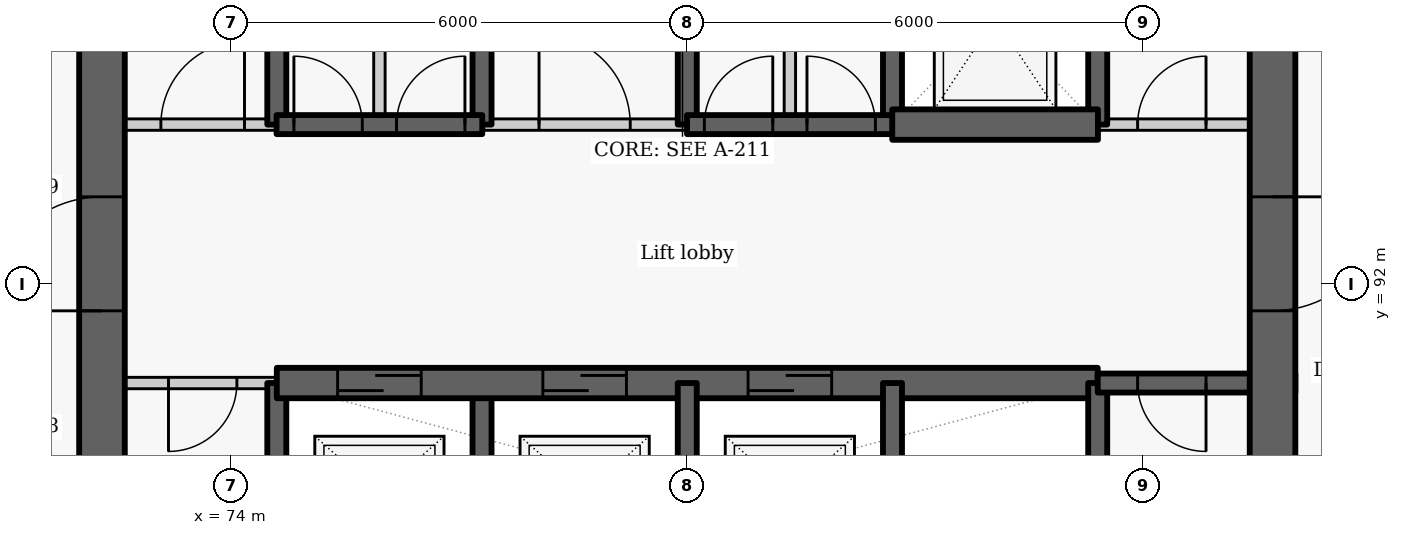
"""IFC4 building model, lengths in metres.
Left out: names, types, materials, properties, quantities, classifications, styles, units other than length and angle.
Written with IfcOpenShell. Run it as: python <this file> out.ifc"""

import sys

from ifc_helpers import new_model, si_unit, direction, frame, frame_2d, origin, place, context, subcontext, project, spatial, rectangle, extrude, element, fill, save


model = new_model("IFC4")
c1 = context("Model", 3, precision=1e-05, world=origin(), true_north=direction((0.0, 1.0)))
c2 = subcontext(c1, "Body", "Model", "MODEL_VIEW")
j1 = project(units=[si_unit("LENGTHUNIT", "METRE"), si_unit("PLANEANGLEUNIT", "RADIAN")], contexts=[c1])
p1 = place(None, origin())
s1 = spatial("IfcSite", under=j1, at=p1, CompositionType="ELEMENT")
p2 = place(p1, origin())
s2 = spatial("IfcBuilding", under=s1, at=p2, CompositionType="ELEMENT")
p3 = place(p2, frame((0.0, 0.0, 44.7)))
s3 = spatial("IfcBuildingStorey", under=s2, at=p3, CompositionType="ELEMENT", Elevation=44.7)
p4 = place(p3, frame((74.6, 87.8, -0.275), z_axis=(0.0, 0.0, 1.0), x_axis=(0.0, 1.0, 0.0)))
e1 = element("IfcWall", 1, at=p4, inside=s3, PredefinedType="SHEAR", context=c2, shape_type="SweptSolid", body=[
    extrude(rectangle(XDim=2.9, YDim=0.25, at=frame_2d((1.45, 0.0))), origin(), (0.0, 0.0, 1.0), 3.3),
])
p5 = place(p3, frame((74.6, 94.1, -0.275), z_axis=(0.0, 0.0, 1.0), x_axis=(0.0, 1.0, 0.0)))
e2 = element("IfcWall", 2, at=p5, inside=s3, PredefinedType="SHEAR", context=c2, shape_type="SweptSolid", body=[
    extrude(rectangle(XDim=2.8, YDim=0.25, at=frame_2d((1.4, 0.0))), origin(), (0.0, 0.0, 1.0), 3.3),
])
p6 = place(p3, frame((74.6, 90.7, 0.0), z_axis=(0.0, 0.0, 1.0), x_axis=(-1.0, 0.0, 0.0)))
e3 = element("IfcWall", 3, at=p6, inside=s3, PredefinedType="PARTITIONING", context=c2, shape_type="SweptSolid", body=[
    extrude(rectangle(XDim=2.6, YDim=0.15, at=frame_2d((1.3, 0.0))), origin(), (0.0, 0.0, 1.0), 3.025),
])
p7 = place(p6, frame((0.525, 0.0, 0.0)))
e4 = element("IfcOpeningElement", 4, at=p7, cuts=e3, PredefinedType="OPENING", context=c2, shape_type="SweptSolid", body=[
    extrude(rectangle(XDim=0.9, YDim=2.1, at=frame_2d((0.45, 1.05))), frame((0.0, 0.085, 0.0), z_axis=(0.0, -1.0, 0.0), x_axis=(1.0, 0.0, 0.0)), (0.0, 0.0, 1.0), 0.17),
])
p8 = place(p3, frame((72.3, 87.8, -0.275), z_axis=(0.0, 0.0, 1.0), x_axis=(0.0, 1.0, 0.0)))
e5 = element("IfcWall", 5, at=p8, inside=s3, PredefinedType="SHEAR", context=c2, shape_type="SweptSolid", body=[
    extrude(rectangle(XDim=9.1, YDim=0.6, at=frame_2d((4.55, 0.0))), origin(), (0.0, 0.0, 1.0), 3.3),
])
p9 = place(p8, frame((3.85, 0.0, 0.275)))
e6 = element("IfcOpeningElement", 6, at=p9, cuts=e5, PredefinedType="OPENING", context=c2, shape_type="SweptSolid", body=[
    extrude(rectangle(XDim=1.5, YDim=2.1, at=frame_2d((0.75, 1.05))), frame((0.0, 0.31, 0.0), z_axis=(0.0, -1.0, 0.0), x_axis=(1.0, 0.0, 0.0)), (0.0, 0.0, 1.0), 0.62),
])
p10 = place(p3, frame((77.3, 87.8, -0.275), z_axis=(0.0, 0.0, 1.0), x_axis=(0.0, 1.0, 0.0)))
e7 = element("IfcWall", 7, at=p10, inside=s3, PredefinedType="SHEAR", context=c2, shape_type="SweptSolid", body=[
    extrude(rectangle(XDim=2.9, YDim=0.25, at=frame_2d((1.45, 0.0))), origin(), (0.0, 0.0, 1.0), 3.3),
])
p11 = place(p3, frame((77.3, 94.1, -0.275), z_axis=(0.0, 0.0, 1.0), x_axis=(0.0, 1.0, 0.0)))
e8 = element("IfcWall", 8, at=p11, inside=s3, PredefinedType="SHEAR", context=c2, shape_type="SweptSolid", body=[
    extrude(rectangle(XDim=2.8, YDim=0.25, at=frame_2d((1.4, 0.0))), origin(), (0.0, 0.0, 1.0), 3.3),
])
p12 = place(p3, frame((74.6, 90.7, -0.275), z_axis=(0.0, 0.0, 1.0), x_axis=(1.0, 0.0, 0.0)))
e9 = element("IfcWall", 9, at=p12, inside=s3, PredefinedType="SHEAR", context=c2, shape_type="SweptSolid", body=[
    extrude(rectangle(XDim=10.8, YDim=0.4, at=frame_2d((5.4, 0.0))), origin(), (0.0, 0.0, 1.0), 3.3),
])
p13 = place(p12, frame((0.8, 0.0, 0.275)))
e10 = element("IfcOpeningElement", 10, at=p13, cuts=e9, PredefinedType="OPENING", context=c2, shape_type="SweptSolid", body=[
    extrude(rectangle(XDim=1.1, YDim=2.1, at=frame_2d((0.55, 1.05))), frame((0.0, 0.21, 0.0), z_axis=(0.0, -1.0, 0.0), x_axis=(1.0, 0.0, 0.0)), (0.0, 0.0, 1.0), 0.42),
])
p14 = place(p12, frame((3.5, 0.0, 0.275)))
e11 = element("IfcOpeningElement", 11, at=p14, cuts=e9, PredefinedType="OPENING", context=c2, shape_type="SweptSolid", body=[
    extrude(rectangle(XDim=1.1, YDim=2.1, at=frame_2d((0.55, 1.05))), frame((0.0, 0.21, 0.0), z_axis=(0.0, -1.0, 0.0), x_axis=(1.0, 0.0, 0.0)), (0.0, 0.0, 1.0), 0.42),
])
p15 = place(p12, frame((6.2, 0.0, 0.275)))
e12 = element("IfcOpeningElement", 12, at=p15, cuts=e9, PredefinedType="OPENING", context=c2, shape_type="SweptSolid", body=[
    extrude(rectangle(XDim=1.1, YDim=2.1, at=frame_2d((0.55, 1.05))), frame((0.0, 0.21, 0.0), z_axis=(0.0, -1.0, 0.0), x_axis=(1.0, 0.0, 0.0)), (0.0, 0.0, 1.0), 0.42),
])
p16 = place(p3, frame((80.0, 87.8, -0.275), z_axis=(0.0, 0.0, 1.0), x_axis=(0.0, 1.0, 0.0)))
e13 = element("IfcWall", 13, at=p16, inside=s3, PredefinedType="SHEAR", context=c2, shape_type="SweptSolid", body=[
    extrude(rectangle(XDim=2.9, YDim=0.25, at=frame_2d((1.45, 0.0))), origin(), (0.0, 0.0, 1.0), 3.3),
])
p17 = place(p3, frame((80.0, 94.1, -0.275), z_axis=(0.0, 0.0, 1.0), x_axis=(0.0, 1.0, 0.0)))
e14 = element("IfcWall", 14, at=p17, inside=s3, PredefinedType="SHEAR", context=c2, shape_type="SweptSolid", body=[
    extrude(rectangle(XDim=2.8, YDim=0.25, at=frame_2d((1.4, 0.0))), origin(), (0.0, 0.0, 1.0), 3.3),
])
p18 = place(p3, frame((82.7, 87.8, -0.275), z_axis=(0.0, 0.0, 1.0), x_axis=(0.0, 1.0, 0.0)))
e15 = element("IfcWall", 15, at=p18, inside=s3, PredefinedType="SHEAR", context=c2, shape_type="SweptSolid", body=[
    extrude(rectangle(XDim=2.9, YDim=0.25, at=frame_2d((1.45, 0.0))), origin(), (0.0, 0.0, 1.0), 3.3),
])
p19 = place(p3, frame((82.7, 94.1, -0.275), z_axis=(0.0, 0.0, 1.0), x_axis=(0.0, 1.0, 0.0)))
e16 = element("IfcWall", 16, at=p19, inside=s3, PredefinedType="SHEAR", context=c2, shape_type="SweptSolid", body=[
    extrude(rectangle(XDim=2.8, YDim=0.25, at=frame_2d((1.4, 0.0))), origin(), (0.0, 0.0, 1.0), 3.3),
])
p20 = place(p3, frame((85.4, 87.8, -0.275), z_axis=(0.0, 0.0, 1.0), x_axis=(0.0, 1.0, 0.0)))
e17 = element("IfcWall", 17, at=p20, inside=s3, PredefinedType="SHEAR", context=c2, shape_type="SweptSolid", body=[
    extrude(rectangle(XDim=2.9, YDim=0.25, at=frame_2d((1.45, 0.0))), origin(), (0.0, 0.0, 1.0), 3.3),
])
p21 = place(p3, frame((85.4, 94.1, -0.275), z_axis=(0.0, 0.0, 1.0), x_axis=(0.0, 1.0, 0.0)))
e18 = element("IfcWall", 18, at=p21, inside=s3, PredefinedType="SHEAR", context=c2, shape_type="SweptSolid", body=[
    extrude(rectangle(XDim=2.8, YDim=0.25, at=frame_2d((1.4, 0.0))), origin(), (0.0, 0.0, 1.0), 3.3),
])
p22 = place(p3, frame((88.0, 90.7, -0.275), z_axis=(0.0, 0.0, 1.0), x_axis=(-1.0, 0.0, 0.0)))
e19 = element("IfcWall", 19, at=p22, inside=s3, PredefinedType="SHEAR", context=c2, shape_type="SweptSolid", body=[
    extrude(rectangle(XDim=2.6, YDim=0.25, at=frame_2d((1.3, 0.0))), origin(), (0.0, 0.0, 1.0), 3.3),
])
p23 = place(p22, frame((1.175, 0.0, 0.275)))
e20 = element("IfcOpeningElement", 20, at=p23, cuts=e19, PredefinedType="OPENING", context=c2, shape_type="SweptSolid", body=[
    extrude(rectangle(XDim=0.9, YDim=2.1, at=frame_2d((0.45, 1.05))), frame((0.0, 0.135, 0.0), z_axis=(0.0, -1.0, 0.0), x_axis=(1.0, 0.0, 0.0)), (0.0, 0.0, 1.0), 0.27),
])
p24 = place(p3, frame((87.7, 103.4, -0.275), z_axis=(0.0, 0.0, 1.0), x_axis=(0.0, -1.0, 0.0)))
e21 = element("IfcWall", 21, at=p24, inside=s3, PredefinedType="SHEAR", context=c2, shape_type="SweptSolid", body=[
    extrude(rectangle(XDim=15.6, YDim=0.6, at=frame_2d((7.8, 0.0))), origin(), (0.0, 0.0, 1.0), 3.3),
])
p25 = place(p24, frame((10.25, 0.0, 0.275)))
e22 = element("IfcOpeningElement", 22, at=p25, cuts=e21, PredefinedType="OPENING", context=c2, shape_type="SweptSolid", body=[
    extrude(rectangle(XDim=1.5, YDim=2.1, at=frame_2d((0.75, 1.05))), frame((0.0, 0.31, 0.0), z_axis=(0.0, -1.0, 0.0), x_axis=(1.0, 0.0, 0.0)), (0.0, 0.0, 1.0), 0.62),
])
p26 = place(p24, frame((2.7, 0.0, 0.275)))
e23 = element("IfcOpeningElement", 23, at=p26, cuts=e21, PredefinedType="OPENING", context=c2, shape_type="SweptSolid", body=[
    extrude(rectangle(XDim=1.1, YDim=2.1, at=frame_2d((0.55, 1.05))), frame((0.0, 0.31, 0.0), z_axis=(0.0, -1.0, 0.0), x_axis=(1.0, 0.0, 0.0)), (0.0, 0.0, 1.0), 0.62),
])
p27 = place(p3, frame((72.0, 94.1, 0.0), z_axis=(0.0, 0.0, 1.0), x_axis=(1.0, 0.0, 0.0)))
e24 = element("IfcWall", 24, at=p27, inside=s3, PredefinedType="PARTITIONING", context=c2, shape_type="SweptSolid", body=[
    extrude(rectangle(XDim=2.603, YDim=0.15, at=frame_2d((1.302, 0.0))), origin(), (0.0, 0.0, 1.0), 3.025),
])
p28 = place(p27, frame((1.075, 0.0, 0.0)))
e25 = element("IfcOpeningElement", 25, at=p28, cuts=e24, PredefinedType="OPENING", context=c2, shape_type="SweptSolid", body=[
    extrude(rectangle(XDim=1.1, YDim=2.1, at=frame_2d((0.55, 1.05))), frame((0.0, 0.085, 0.0), z_axis=(0.0, -1.0, 0.0), x_axis=(1.0, 0.0, 0.0)), (0.0, 0.0, 1.0), 0.17),
])
p29 = place(p3, frame((77.297, 94.1, 0.0), z_axis=(0.0, 0.0, 1.0), x_axis=(1.0, 0.0, 0.0)))
e26 = element("IfcWall", 26, at=p29, inside=s3, PredefinedType="PARTITIONING", context=c2, shape_type="SweptSolid", body=[
    extrude(rectangle(XDim=2.706, YDim=0.15, at=frame_2d((1.353, 0.0))), origin(), (0.0, 0.0, 1.0), 3.025),
])
p30 = place(p29, frame((0.753, 0.0, 0.0)))
e27 = element("IfcOpeningElement", 27, at=p30, cuts=e26, PredefinedType="OPENING", context=c2, shape_type="SweptSolid", body=[
    extrude(rectangle(XDim=1.2, YDim=2.1, at=frame_2d((0.6, 1.05))), frame((0.0, 0.085, 0.0), z_axis=(0.0, -1.0, 0.0), x_axis=(1.0, 0.0, 0.0)), (0.0, 0.0, 1.0), 0.17),
])
p31 = place(p3, frame((85.397, 94.1, 0.0), z_axis=(0.0, 0.0, 1.0), x_axis=(1.0, 0.0, 0.0)))
e28 = element("IfcWall", 28, at=p31, inside=s3, PredefinedType="PARTITIONING", context=c2, shape_type="SweptSolid", body=[
    extrude(rectangle(XDim=2.603, YDim=0.15, at=frame_2d((1.302, 0.0))), origin(), (0.0, 0.0, 1.0), 3.025),
])
p32 = place(p31, frame((0.528, 0.0, 0.0)))
e29 = element("IfcOpeningElement", 29, at=p32, cuts=e28, PredefinedType="OPENING", context=c2, shape_type="SweptSolid", body=[
    extrude(rectangle(XDim=0.9, YDim=2.1, at=frame_2d((0.45, 1.05))), frame((0.0, 0.085, 0.0), z_axis=(0.0, -1.0, 0.0), x_axis=(1.0, 0.0, 0.0)), (0.0, 0.0, 1.0), 0.17),
])
p33 = place(p3, frame((74.597, 94.1, -0.275), z_axis=(0.0, 0.0, 1.0), x_axis=(1.0, 0.0, 0.0)))
e30 = element("IfcWall", 30, at=p33, inside=s3, PredefinedType="SHEAR", context=c2, shape_type="SweptSolid", body=[
    extrude(rectangle(XDim=2.706, YDim=0.25, at=frame_2d((1.353, 0.0))), origin(), (0.0, 0.0, 1.0), 3.3),
])
p34 = place(p33, frame((0.228, 0.0, 0.275)))
e31 = element("IfcOpeningElement", 31, at=p34, cuts=e30, PredefinedType="OPENING", context=c2, shape_type="SweptSolid", body=[
    extrude(rectangle(XDim=0.9, YDim=2.1, at=frame_2d((0.45, 1.05))), frame((0.0, 0.135, 0.0), z_axis=(0.0, -1.0, 0.0), x_axis=(1.0, 0.0, 0.0)), (0.0, 0.0, 1.0), 0.27),
])
p35 = place(p33, frame((1.578, 0.0, 0.275)))
e32 = element("IfcOpeningElement", 32, at=p35, cuts=e30, PredefinedType="OPENING", context=c2, shape_type="SweptSolid", body=[
    extrude(rectangle(XDim=0.9, YDim=2.1, at=frame_2d((0.45, 1.05))), frame((0.0, 0.135, 0.0), z_axis=(0.0, -1.0, 0.0), x_axis=(1.0, 0.0, 0.0)), (0.0, 0.0, 1.0), 0.27),
])
p36 = place(p3, frame((79.997, 94.1, -0.275), z_axis=(0.0, 0.0, 1.0), x_axis=(1.0, 0.0, 0.0)))
e33 = element("IfcWall", 33, at=p36, inside=s3, PredefinedType="SHEAR", context=c2, shape_type="SweptSolid", body=[
    extrude(rectangle(XDim=2.706, YDim=0.25, at=frame_2d((1.353, 0.0))), origin(), (0.0, 0.0, 1.0), 3.3),
])
p37 = place(p36, frame((0.228, 0.0, 0.275)))
e34 = element("IfcOpeningElement", 34, at=p37, cuts=e33, PredefinedType="OPENING", context=c2, shape_type="SweptSolid", body=[
    extrude(rectangle(XDim=0.9, YDim=2.1, at=frame_2d((0.45, 1.05))), frame((0.0, 0.135, 0.0), z_axis=(0.0, -1.0, 0.0), x_axis=(1.0, 0.0, 0.0)), (0.0, 0.0, 1.0), 0.27),
])
p38 = place(p36, frame((1.578, 0.0, 0.275)))
e35 = element("IfcOpeningElement", 35, at=p38, cuts=e33, PredefinedType="OPENING", context=c2, shape_type="SweptSolid", body=[
    extrude(rectangle(XDim=0.9, YDim=2.1, at=frame_2d((0.45, 1.05))), frame((0.0, 0.135, 0.0), z_axis=(0.0, -1.0, 0.0), x_axis=(1.0, 0.0, 0.0)), (0.0, 0.0, 1.0), 0.27),
])
p39 = place(p3, frame((82.697, 94.1, -0.275), z_axis=(0.0, 0.0, 1.0), x_axis=(1.0, 0.0, 0.0)))
e36 = element("IfcWall", 36, at=p39, inside=s3, PredefinedType="SHEAR", context=c2, shape_type="SweptSolid", body=[
    extrude(rectangle(XDim=2.706, YDim=0.4, at=frame_2d((1.353, 0.0))), origin(), (0.0, 0.0, 1.0), 3.3),
])
for number, where, z_axis, x_axis in (
    (37, (75.95, 94.1, 0.0), (0.0, 0.0, 1.0), (0.0, 1.0, 0.0)),
    (38, (81.35, 94.1, 0.0), (0.0, 0.0, 1.0), (0.0, 1.0, 0.0)),
):
    element("IfcWall", number, at=place(p3, frame(where, z_axis=z_axis, x_axis=x_axis)), inside=s3, PredefinedType="PARTITIONING", context=c2, shape_type="SweptSolid", body=[
        extrude(rectangle(XDim=2.8, YDim=0.15, at=frame_2d((1.4, 0.0))), origin(), (0.0, 0.0, 1.0), 3.025),
    ])
p40 = place(p7, origin())
e39 = element("IfcDoor", 39, at=p40, inside=s3, OperationType="SINGLE_SWING_RIGHT", PredefinedType="DOOR", context=c2, shape_type="SweptSolid", body=[
    extrude(rectangle(XDim=0.9, YDim=2.1, at=frame_2d((0.45, 1.05))), frame((0.0, 0.025, 0.0), z_axis=(0.0, -1.0, 0.0), x_axis=(1.0, 0.0, 0.0)), (0.0, 0.0, 1.0), 0.05),
])
fill(e4, e39)
p41 = place(p13, origin())
e40 = element("IfcDoor", 40, at=p41, inside=s3, OperationType="SLIDING_TO_LEFT", PredefinedType="DOOR", context=c2, shape_type="SweptSolid", body=[
    extrude(rectangle(XDim=1.1, YDim=2.1, at=frame_2d((0.55, 1.05))), frame((0.0, 0.025, 0.0), z_axis=(0.0, -1.0, 0.0), x_axis=(1.0, 0.0, 0.0)), (0.0, 0.0, 1.0), 0.05),
])
fill(e10, e40)
p42 = place(p14, origin())
e41 = element("IfcDoor", 41, at=p42, inside=s3, OperationType="SLIDING_TO_LEFT", PredefinedType="DOOR", context=c2, shape_type="SweptSolid", body=[
    extrude(rectangle(XDim=1.1, YDim=2.1, at=frame_2d((0.55, 1.05))), frame((0.0, 0.025, 0.0), z_axis=(0.0, -1.0, 0.0), x_axis=(1.0, 0.0, 0.0)), (0.0, 0.0, 1.0), 0.05),
])
fill(e11, e41)
p43 = place(p15, origin())
e42 = element("IfcDoor", 42, at=p43, inside=s3, OperationType="SLIDING_TO_LEFT", PredefinedType="DOOR", context=c2, shape_type="SweptSolid", body=[
    extrude(rectangle(XDim=1.1, YDim=2.1, at=frame_2d((0.55, 1.05))), frame((0.0, 0.025, 0.0), z_axis=(0.0, -1.0, 0.0), x_axis=(1.0, 0.0, 0.0)), (0.0, 0.0, 1.0), 0.05),
])
fill(e12, e42)
p44 = place(p23, origin())
e43 = element("IfcDoor", 43, at=p44, inside=s3, OperationType="SINGLE_SWING_LEFT", PredefinedType="DOOR", context=c2, shape_type="SweptSolid", body=[
    extrude(rectangle(XDim=0.9, YDim=2.1, at=frame_2d((0.45, 1.05))), frame((0.0, 0.025, 0.0), z_axis=(0.0, -1.0, 0.0), x_axis=(1.0, 0.0, 0.0)), (0.0, 0.0, 1.0), 0.05),
])
fill(e20, e43)
p45 = place(p28, origin())
e44 = element("IfcDoor", 44, at=p45, inside=s3, OperationType="SINGLE_SWING_RIGHT", PredefinedType="DOOR", context=c2, shape_type="SweptSolid", body=[
    extrude(rectangle(XDim=1.1, YDim=2.1, at=frame_2d((0.55, 1.05))), frame((0.0, 0.025, 0.0), z_axis=(0.0, -1.0, 0.0), x_axis=(1.0, 0.0, 0.0)), (0.0, 0.0, 1.0), 0.05),
])
fill(e25, e44)
p46 = place(p34, origin())
e45 = element("IfcDoor", 45, at=p46, inside=s3, OperationType="SINGLE_SWING_LEFT", PredefinedType="DOOR", context=c2, shape_type="SweptSolid", body=[
    extrude(rectangle(XDim=0.9, YDim=2.1, at=frame_2d((0.45, 1.05))), frame((0.0, 0.025, 0.0), z_axis=(0.0, -1.0, 0.0), x_axis=(1.0, 0.0, 0.0)), (0.0, 0.0, 1.0), 0.05),
])
fill(e31, e45)
p47 = place(p35, origin())
e46 = element("IfcDoor", 46, at=p47, inside=s3, OperationType="SINGLE_SWING_RIGHT", PredefinedType="DOOR", context=c2, shape_type="SweptSolid", body=[
    extrude(rectangle(XDim=0.9, YDim=2.1, at=frame_2d((0.45, 1.05))), frame((0.0, 0.025, 0.0), z_axis=(0.0, -1.0, 0.0), x_axis=(1.0, 0.0, 0.0)), (0.0, 0.0, 1.0), 0.05),
])
fill(e32, e46)
p48 = place(p30, origin())
e47 = element("IfcDoor", 47, at=p48, inside=s3, OperationType="DOUBLE_DOOR_SINGLE_SWING", PredefinedType="DOOR", context=c2, shape_type="SweptSolid", body=[
    extrude(rectangle(XDim=1.2, YDim=2.1, at=frame_2d((0.6, 1.05))), frame((0.0, 0.025, 0.0), z_axis=(0.0, -1.0, 0.0), x_axis=(1.0, 0.0, 0.0)), (0.0, 0.0, 1.0), 0.05),
])
fill(e27, e47)
p49 = place(p37, origin())
e48 = element("IfcDoor", 48, at=p49, inside=s3, OperationType="SINGLE_SWING_RIGHT", PredefinedType="DOOR", context=c2, shape_type="SweptSolid", body=[
    extrude(rectangle(XDim=0.9, YDim=2.1, at=frame_2d((0.45, 1.05))), frame((0.0, 0.025, 0.0), z_axis=(0.0, -1.0, 0.0), x_axis=(1.0, 0.0, 0.0)), (0.0, 0.0, 1.0), 0.05),
])
fill(e34, e48)
p50 = place(p38, origin())
e49 = element("IfcDoor", 49, at=p50, inside=s3, OperationType="SINGLE_SWING_LEFT", PredefinedType="DOOR", context=c2, shape_type="SweptSolid", body=[
    extrude(rectangle(XDim=0.9, YDim=2.1, at=frame_2d((0.45, 1.05))), frame((0.0, 0.025, 0.0), z_axis=(0.0, -1.0, 0.0), x_axis=(1.0, 0.0, 0.0)), (0.0, 0.0, 1.0), 0.05),
])
fill(e35, e49)
p51 = place(p32, origin())
e50 = element("IfcDoor", 50, at=p51, inside=s3, OperationType="SINGLE_SWING_RIGHT", PredefinedType="DOOR", context=c2, shape_type="SweptSolid", body=[
    extrude(rectangle(XDim=0.9, YDim=2.1, at=frame_2d((0.45, 1.05))), frame((0.0, 0.025, 0.0), z_axis=(0.0, -1.0, 0.0), x_axis=(1.0, 0.0, 0.0)), (0.0, 0.0, 1.0), 0.05),
])
fill(e29, e50)
p52 = place(p25, origin())
e51 = element("IfcDoor", 51, at=p52, inside=s3, OperationType="DOUBLE_DOOR_SINGLE_SWING", PredefinedType="DOOR", context=c2, shape_type="SweptSolid", body=[
    extrude(rectangle(XDim=1.5, YDim=2.1, at=frame_2d((0.75, 1.05))), frame((0.0, 0.025, 0.0), z_axis=(0.0, -1.0, 0.0), x_axis=(1.0, 0.0, 0.0)), (0.0, 0.0, 1.0), 0.05),
])
fill(e22, e51)
p53 = place(p9, origin())
e52 = element("IfcDoor", 52, at=p53, inside=s3, OperationType="DOUBLE_DOOR_SINGLE_SWING", PredefinedType="DOOR", context=c2, shape_type="SweptSolid", body=[
    extrude(rectangle(XDim=1.5, YDim=2.1, at=frame_2d((0.75, 1.05))), frame((0.0, 0.025, 0.0), z_axis=(0.0, -1.0, 0.0), x_axis=(1.0, 0.0, 0.0)), (0.0, 0.0, 1.0), 0.05),
])
fill(e6, e52)
save(model, sys.argv[1])
